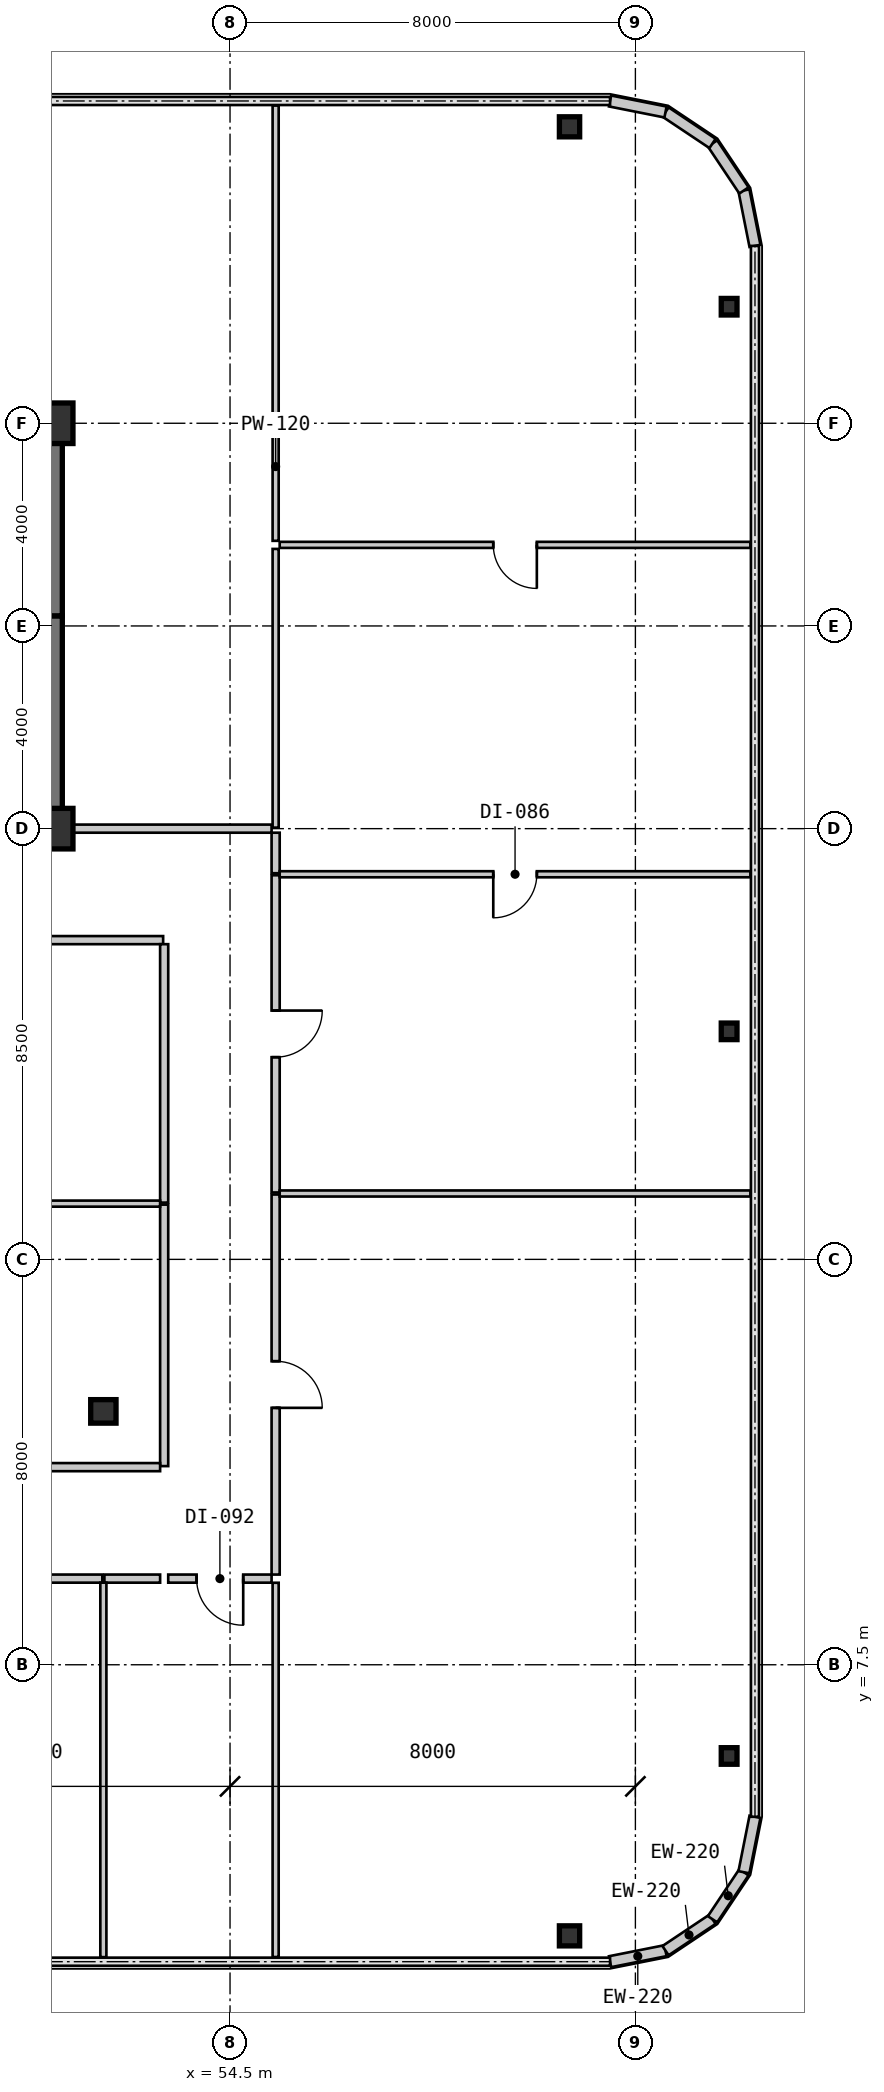
"""IFC4 building model, lengths in metres.
Left out: names, types, materials, properties, quantities, classifications, styles, units other than length and angle.
Written with IfcOpenShell. Run it as: python <this file> out.ifc"""

import sys

from ifc_helpers import new_model, si_unit, direction, frame, frame_2d, origin, origin_2d, place, context, subcontext, project, spatial, rectangle, i_section, extrude, source, transform, mapped, element, fill, save


model = new_model("IFC4")
c1 = context("Model", 3, precision=1e-05, world=origin(), true_north=direction((0.0, 1.0)))
c2 = subcontext(c1, "Body", "Model", "MODEL_VIEW")
j1 = project(units=[si_unit("LENGTHUNIT", "METRE"), si_unit("PLANEANGLEUNIT", "RADIAN")], contexts=[c1])
p1 = place(None, origin())
s1 = spatial("IfcSite", under=j1, at=p1, CompositionType="ELEMENT")
p2 = place(p1, origin())
s2 = spatial("IfcBuilding", under=s1, at=p2, CompositionType="ELEMENT")
p3 = place(p2, frame((0.0, 0.0, 45.15)))
s3 = spatial("IfcBuildingStorey", under=s2, at=p3, CompositionType="ELEMENT", Elevation=45.15)
m1 = source(origin(), c2, "Body", "SweptSolid", [
    extrude(rectangle(XDim=0.8, YDim=0.8, at=origin_2d()), origin(), (0.0, 0.0, 1.0), 3.15),
])
for number, where, z_axis, x_axis in (
    (1, (51.0, 24.0, 0.0), (0.0, 0.0, 1.0), (1.0, 0.0, 0.0)),
    (2, (51.0, 32.0, 0.0), (0.0, 0.0, 1.0), (1.0, 0.0, 0.0)),
):
    element("IfcColumn", number, at=place(p3, frame(where, z_axis=z_axis, x_axis=x_axis)), inside=s3, PredefinedType="COLUMN", context=c2, shape_type="MappedRepresentation", body=[
        mapped(m1, transform((0.0, 0.0, 0.0), scale=1.0)),
    ])
m2 = source(origin(), c2, "Body", "SweptSolid", [
    extrude(i_section(OverallWidth=0.5, OverallDepth=0.464, WebThickness=0.022, FlangeThickness=0.034, at=origin_2d()), origin(), (0.0, 0.0, 1.0), 3.15),
])
p4 = place(p3, frame((52.0, 12.5, 0.0), z_axis=(0.0, 0.0, 1.0), x_axis=(1.0, 0.0, 0.0)))
e3 = element("IfcColumn", 3, at=p4, inside=s3, PredefinedType="COLUMN", context=c2, shape_type="MappedRepresentation", body=[
    mapped(m2, transform((0.0, 0.0, 0.0), scale=1.0)),
])
m3 = source(origin(), c2, "Body", "SweptSolid", [
    extrude(i_section(OverallWidth=0.4, OverallDepth=0.396, WebThickness=0.022, FlangeThickness=0.034, at=origin_2d()), origin(), (0.0, 0.0, 1.0), 3.15),
])
for number, where, z_axis, x_axis in (
    (4, (61.2, 2.15, 0.0), (0.0, 0.0, 1.0), (1.0, 0.0, 0.0)),
    (5, (61.2, 37.85, 0.0), (0.0, 0.0, 1.0), (1.0, 0.0, 0.0)),
):
    element("IfcColumn", number, at=place(p3, frame(where, z_axis=z_axis, x_axis=x_axis)), inside=s3, PredefinedType="COLUMN", context=c2, shape_type="MappedRepresentation", body=[
        mapped(m3, transform((0.0, 0.0, 0.0), scale=1.0)),
    ])
m4 = source(origin(), c2, "Body", "SweptSolid", [
    extrude(i_section(OverallWidth=0.311, OverallDepth=0.327, WebThickness=0.016, FlangeThickness=0.025, at=origin_2d()), origin(), (0.0, 0.0, 1.0), 3.15),
])
for number, where, z_axis, x_axis in (
    (6, (64.35, 5.7, 0.0), (0.0, 0.0, 1.0), (1.0, 0.0, 0.0)),
    (7, (64.35, 20.0, 0.0), (0.0, 0.0, 1.0), (1.0, 0.0, 0.0)),
    (8, (64.35, 34.3, 0.0), (0.0, 0.0, 1.0), (1.0, 0.0, 0.0)),
):
    element("IfcColumn", number, at=place(p3, frame(where, z_axis=z_axis, x_axis=x_axis)), inside=s3, PredefinedType="COLUMN", context=c2, shape_type="MappedRepresentation", body=[
        mapped(m4, transform((0.0, 0.0, 0.0), scale=1.0)),
    ])
m5 = source(origin(), c2, "Body", "SweptSolid", [
    extrude(rectangle(XDim=1.116, YDim=0.22, at=frame_2d((0.558, 0.0))), origin(), (0.0, 0.0, 1.0), 2.93),
])
for number, where, z_axis, x_axis in (
    (9, (62.0, 1.64, 0.0), (0.0, 0.0, 1.0), (0.981, 0.195, 0.0)),
    (10, (63.094, 1.858, 0.0), (0.0, 0.0, 1.0), (0.831, 0.556, 0.0)),
    (11, (64.022, 2.478, 0.0), (0.0, 0.0, 1.0), (0.556, 0.831, 0.0)),
    (12, (64.642, 3.406, 0.0), (0.0, 0.0, 1.0), (0.195, 0.981, 0.0)),
    (13, (64.86, 35.5, 0.0), (0.0, 0.0, 1.0), (-0.195, 0.981, 0.0)),
    (14, (64.642, 36.594, 0.0), (0.0, 0.0, 1.0), (-0.556, 0.831, 0.0)),
    (15, (64.022, 37.522, 0.0), (0.0, 0.0, 1.0), (-0.831, 0.556, 0.0)),
    (16, (63.094, 38.142, 0.0), (0.0, 0.0, 1.0), (-0.981, 0.195, 0.0)),
):
    element("IfcWall", number, at=place(p3, frame(where, z_axis=z_axis, x_axis=x_axis)), inside=s3, PredefinedType="SOLIDWALL", context=c2, shape_type="MappedRepresentation", body=[
        mapped(m5, transform((0.0, 0.0, 0.0), scale=1.0)),
    ])
m6 = source(origin(), c2, "Body", "SweptSolid", [
    extrude(rectangle(XDim=11.99, YDim=0.38, at=frame_2d((5.995, 0.0))), origin(), (0.0, 0.0, 1.0), 2.93),
])
p5 = place(p3, frame((39.2, 32.0, 0.0), z_axis=(0.0, 0.0, 1.0), x_axis=(1.0, 0.0, 0.0)))
e17 = element("IfcWall", 17, at=p5, inside=s3, PredefinedType="SHEAR", context=c2, shape_type="MappedRepresentation", body=[
    mapped(m6, transform((0.0, 0.0, 0.0), scale=1.0)),
])
m7 = source(origin(), c2, "Body", "SweptSolid", [
    extrude(rectangle(XDim=4.01, YDim=0.38, at=frame_2d((2.005, 0.0))), origin(), (0.0, 0.0, 1.0), 2.93),
])
p6 = place(p3, frame((51.0, 24.19, 0.0), z_axis=(0.0, 0.0, 1.0), x_axis=(0.0, 1.0, 0.0)))
e18 = element("IfcWall", 18, at=p6, inside=s3, PredefinedType="SHEAR", context=c2, shape_type="MappedRepresentation", body=[
    mapped(m7, transform((0.0, 0.0, 0.0), scale=1.0)),
])
m8 = source(origin(), c2, "Body", "SweptSolid", [
    extrude(rectangle(XDim=3.61, YDim=0.38, at=frame_2d((1.805, 0.0))), origin(), (0.0, 0.0, 1.0), 2.93),
])
p7 = place(p3, frame((51.0, 28.2, 0.0), z_axis=(0.0, 0.0, 1.0), x_axis=(0.0, 1.0, 0.0)))
e19 = element("IfcWall", 19, at=p7, inside=s3, PredefinedType="SHEAR", context=c2, shape_type="MappedRepresentation", body=[
    mapped(m8, transform((0.0, 0.0, 0.0), scale=1.0)),
])
m9 = source(origin(), c2, "Body", "SweptSolid", [
    extrude(rectangle(XDim=4.98, YDim=0.38, at=frame_2d((2.49, 0.0))), origin(), (0.0, 0.0, 1.0), 2.93),
])
p8 = place(p3, frame((46.21, 24.0, 0.0), z_axis=(0.0, 0.0, 1.0), x_axis=(1.0, 0.0, 0.0)))
e20 = element("IfcWall", 20, at=p8, inside=s3, PredefinedType="SHEAR", context=c2, shape_type="MappedRepresentation", body=[
    mapped(m9, transform((0.0, 0.0, 0.0), scale=1.0)),
])
m10 = source(origin(), c2, "Body", "SweptSolid", [
    extrude(rectangle(XDim=5.16, YDim=0.16, at=frame_2d((2.58, 0.0))), origin(), (0.0, 0.0, 1.0), 2.93),
])
p9 = place(p3, frame((53.2, 11.42, 0.0), z_axis=(0.0, 0.0, 1.0), x_axis=(0.0, 1.0, 0.0)))
e21 = element("IfcWall", 21, at=p9, inside=s3, PredefinedType="PARTITIONING", context=c2, shape_type="MappedRepresentation", body=[
    mapped(m10, transform((0.0, 0.0, 0.0), scale=1.0)),
])
m11 = source(origin(), c2, "Body", "SweptSolid", [
    extrude(rectangle(XDim=12.159, YDim=0.16, at=frame_2d((6.08, 0.0))), origin(), (0.0, 0.0, 1.0), 2.93),
])
p10 = place(p3, frame((53.18, 21.8, 0.0), z_axis=(0.0, 0.0, 1.0), x_axis=(-1.0, 0.0, 0.0)))
e22 = element("IfcWall", 22, at=p10, inside=s3, PredefinedType="PARTITIONING", context=c2, shape_type="MappedRepresentation", body=[
    mapped(m11, transform((0.0, 0.0, 0.0), scale=1.0)),
])
m12 = source(origin(), c2, "Body", "SweptSolid", [
    extrude(rectangle(XDim=1.05, YDim=2.1, at=frame_2d((0.525, 1.05))), frame((0.0, 0.09, 0.0), z_axis=(0.0, -1.0, 0.0), x_axis=(1.0, 0.0, 0.0)), (0.0, 0.0, 1.0), 0.18),
])
p11 = place(p10, frame((5.555, 0.0, 0.0)))
e23 = element("IfcOpeningElement", 23, at=p11, cuts=e22, PredefinedType="OPENING", context=c2, shape_type="MappedRepresentation", body=[
    mapped(m12, transform((0.0, 0.0, 0.0), scale=1.0)),
])
m13 = source(origin(), c2, "Body", "SweptSolid", [
    extrude(rectangle(XDim=5.1, YDim=0.16, at=frame_2d((2.55, 0.0))), origin(), (0.0, 0.0, 1.0), 2.93),
])
p12 = place(p3, frame((53.2, 16.62, 0.0), z_axis=(0.0, 0.0, 1.0), x_axis=(0.0, 1.0, 0.0)))
e24 = element("IfcWall", 24, at=p12, inside=s3, PredefinedType="PARTITIONING", context=c2, shape_type="MappedRepresentation", body=[
    mapped(m13, transform((0.0, 0.0, 0.0), scale=1.0)),
])
m14 = source(origin(), c2, "Body", "SweptSolid", [
    extrude(rectangle(XDim=2.04, YDim=0.16, at=frame_2d((1.02, 0.0))), origin(), (0.0, 0.0, 1.0), 2.93),
])
p13 = place(p3, frame((55.32, 9.2, 0.0), z_axis=(0.0, 0.0, 1.0), x_axis=(-1.0, 0.0, 0.0)))
e25 = element("IfcWall", 25, at=p13, inside=s3, PredefinedType="PARTITIONING", context=c2, shape_type="MappedRepresentation", body=[
    mapped(m14, transform((0.0, 0.0, 0.0), scale=1.0)),
])
m15 = source(origin(), c2, "Body", "SweptSolid", [
    extrude(rectangle(XDim=0.92, YDim=2.1, at=frame_2d((0.46, 1.05))), frame((0.0, 0.09, 0.0), z_axis=(0.0, -1.0, 0.0), x_axis=(1.0, 0.0, 0.0)), (0.0, 0.0, 1.0), 0.18),
])
p14 = place(p13, frame((0.56, 0.0, 0.0)))
e26 = element("IfcOpeningElement", 26, at=p14, cuts=e25, PredefinedType="OPENING", context=c2, shape_type="MappedRepresentation", body=[
    mapped(m15, transform((0.0, 0.0, 0.0), scale=1.0)),
])
m16 = source(origin(), c2, "Body", "SweptSolid", [
    extrude(rectangle(XDim=7.5, YDim=0.16, at=frame_2d((3.75, 0.0))), origin(), (0.0, 0.0, 1.0), 2.93),
])
p15 = place(p3, frame((55.4, 16.78, 0.0), z_axis=(0.0, 0.0, 1.0), x_axis=(0.0, -1.0, 0.0)))
e27 = element("IfcWall", 27, at=p15, inside=s3, PredefinedType="PARTITIONING", context=c2, shape_type="MappedRepresentation", body=[
    mapped(m16, transform((0.0, 0.0, 0.0), scale=1.0)),
])
p16 = place(p15, frame((3.29, 0.0, 0.0)))
e28 = element("IfcOpeningElement", 28, at=p16, cuts=e27, PredefinedType="OPENING", context=c2, shape_type="MappedRepresentation", body=[
    mapped(m15, transform((0.0, 0.0, 0.0), scale=1.0)),
])
m17 = source(origin(), c2, "Body", "SweptSolid", [
    extrude(rectangle(XDim=6.26, YDim=0.16, at=frame_2d((3.13, 0.0))), origin(), (0.0, 0.0, 1.0), 2.93),
])
p17 = place(p3, frame((55.4, 23.08, 0.0), z_axis=(0.0, 0.0, 1.0), x_axis=(0.0, -1.0, 0.0)))
e29 = element("IfcWall", 29, at=p17, inside=s3, PredefinedType="PARTITIONING", context=c2, shape_type="MappedRepresentation", body=[
    mapped(m17, transform((0.0, 0.0, 0.0), scale=1.0)),
])
p18 = place(p17, frame((2.67, 0.0, 0.0)))
e30 = element("IfcOpeningElement", 30, at=p18, cuts=e29, PredefinedType="OPENING", context=c2, shape_type="MappedRepresentation", body=[
    mapped(m15, transform((0.0, 0.0, 0.0), scale=1.0)),
])
m18 = source(origin(), c2, "Body", "SweptSolid", [
    extrude(rectangle(XDim=0.8, YDim=0.16, at=frame_2d((0.4, 0.0))), origin(), (0.0, 0.0, 1.0), 2.93),
])
p19 = place(p3, frame((55.4, 23.92, 0.0), z_axis=(0.0, 0.0, 1.0), x_axis=(0.0, -1.0, 0.0)))
e31 = element("IfcWall", 31, at=p19, inside=s3, PredefinedType="PARTITIONING", context=c2, shape_type="MappedRepresentation", body=[
    mapped(m18, transform((0.0, 0.0, 0.0), scale=1.0)),
])
m19 = source(origin(), c2, "Body", "SweptSolid", [
    extrude(rectangle(XDim=4.13, YDim=0.16, at=frame_2d((2.065, 0.0))), origin(), (0.0, 0.0, 1.0), 2.93),
])
p20 = place(p3, frame((51.19, 24.0, 0.0), z_axis=(0.0, 0.0, 1.0), x_axis=(1.0, 0.0, 0.0)))
e32 = element("IfcWall", 32, at=p20, inside=s3, PredefinedType="PARTITIONING", context=c2, shape_type="MappedRepresentation", body=[
    mapped(m19, transform((0.0, 0.0, 0.0), scale=1.0)),
])
m20 = source(origin(), c2, "Body", "SweptSolid", [
    extrude(rectangle(XDim=12.1, YDim=0.16, at=frame_2d((6.05, 0.0))), origin(), (0.0, 0.0, 1.0), 2.93),
])
p21 = place(p3, frame((41.02, 11.4, 0.0), z_axis=(0.0, 0.0, 1.0), x_axis=(1.0, 0.0, 0.0)))
e33 = element("IfcWall", 33, at=p21, inside=s3, PredefinedType="PARTITIONING", context=c2, shape_type="MappedRepresentation", body=[
    mapped(m20, transform((0.0, 0.0, 0.0), scale=1.0)),
])
p22 = place(p21, frame((5.525, 0.0, 0.0)))
e34 = element("IfcOpeningElement", 34, at=p22, cuts=e33, PredefinedType="OPENING", context=c2, shape_type="MappedRepresentation", body=[
    mapped(m12, transform((0.0, 0.0, 0.0), scale=1.0)),
])
m21 = source(origin(), c2, "Body", "SweptSolid", [
    extrude(rectangle(XDim=9.959, YDim=0.16, at=frame_2d((4.98, 0.0))), origin(), (0.0, 0.0, 1.0), 2.93),
])
p23 = place(p3, frame((51.98, 9.2, 0.0), z_axis=(0.0, 0.0, 1.0), x_axis=(-1.0, 0.0, 0.0)))
e35 = element("IfcWall", 35, at=p23, inside=s3, PredefinedType="PARTITIONING", context=c2, shape_type="MappedRepresentation", body=[
    mapped(m21, transform((0.0, 0.0, 0.0), scale=1.0)),
])
p24 = place(p23, frame((4.52, 0.0, 0.0)))
e36 = element("IfcOpeningElement", 36, at=p24, cuts=e35, PredefinedType="OPENING", context=c2, shape_type="MappedRepresentation", body=[
    mapped(m15, transform((0.0, 0.0, 0.0), scale=1.0)),
])
m22 = source(origin(), c2, "Body", "SweptSolid", [
    extrude(rectangle(XDim=1.1, YDim=0.16, at=frame_2d((0.55, 0.0))), origin(), (0.0, 0.0, 1.0), 2.93),
])
p25 = place(p3, frame((53.12, 9.2, 0.0), z_axis=(0.0, 0.0, 1.0), x_axis=(-1.0, 0.0, 0.0)))
e37 = element("IfcWall", 37, at=p25, inside=s3, PredefinedType="PARTITIONING", context=c2, shape_type="MappedRepresentation", body=[
    mapped(m22, transform((0.0, 0.0, 0.0), scale=1.0)),
])
m23 = source(origin(), c2, "Body", "SweptSolid", [
    extrude(rectangle(XDim=12.04, YDim=0.12, at=frame_2d((6.02, 0.0))), origin(), (0.0, 0.0, 1.0), 2.93),
])
p26 = place(p3, frame((41.08, 16.6, 0.0), z_axis=(0.0, 0.0, 1.0), x_axis=(1.0, 0.0, 0.0)))
e38 = element("IfcWall", 38, at=p26, inside=s3, PredefinedType="PARTITIONING", context=c2, shape_type="MappedRepresentation", body=[
    mapped(m23, transform((0.0, 0.0, 0.0), scale=1.0)),
])
m24 = source(origin(), c2, "Body", "SweptSolid", [
    extrude(rectangle(XDim=7.39, YDim=0.12, at=frame_2d((3.695, 0.0))), origin(), (0.0, 0.0, 1.0), 2.93),
])
p27 = place(p3, frame((52.0, 9.12, 0.0), z_axis=(0.0, 0.0, 1.0), x_axis=(0.0, -1.0, 0.0)))
e39 = element("IfcWall", 39, at=p27, inside=s3, PredefinedType="PARTITIONING", context=c2, shape_type="MappedRepresentation", body=[
    mapped(m24, transform((0.0, 0.0, 0.0), scale=1.0)),
])
m25 = source(origin(), c2, "Body", "SweptSolid", [
    extrude(rectangle(XDim=7.386, YDim=0.12, at=frame_2d((3.693, 0.0))), origin(), (0.0, 0.0, 1.0), 2.93),
])
p28 = place(p3, frame((55.4, 9.118, 0.0), z_axis=(0.0, 0.0, 1.0), x_axis=(0.0, -1.0, 0.0)))
e40 = element("IfcWall", 40, at=p28, inside=s3, PredefinedType="PARTITIONING", context=c2, shape_type="MappedRepresentation", body=[
    mapped(m25, transform((0.0, 0.0, 0.0), scale=1.0)),
])
m26 = source(origin(), c2, "Body", "SweptSolid", [
    extrude(rectangle(XDim=9.29, YDim=0.12, at=frame_2d((4.645, 0.0))), origin(), (0.0, 0.0, 1.0), 2.93),
])
p29 = place(p3, frame((55.48, 16.8, 0.0), z_axis=(0.0, 0.0, 1.0), x_axis=(1.0, 0.0, 0.0)))
e41 = element("IfcWall", 41, at=p29, inside=s3, PredefinedType="PARTITIONING", context=c2, shape_type="MappedRepresentation", body=[
    mapped(m26, transform((0.0, 0.0, 0.0), scale=1.0)),
])
p30 = place(p3, frame((55.48, 23.1, 0.0), z_axis=(0.0, 0.0, 1.0), x_axis=(1.0, 0.0, 0.0)))
e42 = element("IfcWall", 42, at=p30, inside=s3, PredefinedType="PARTITIONING", context=c2, shape_type="MappedRepresentation", body=[
    mapped(m26, transform((0.0, 0.0, 0.0), scale=1.0)),
])
m27 = source(origin(), c2, "Body", "SweptSolid", [
    extrude(rectangle(XDim=0.86, YDim=2.1, at=frame_2d((0.43, 1.05))), frame((0.0, 0.07, 0.0), z_axis=(0.0, -1.0, 0.0), x_axis=(1.0, 0.0, 0.0)), (0.0, 0.0, 1.0), 0.14),
])
p31 = place(p30, frame((4.215, 0.0, 0.0)))
e43 = element("IfcOpeningElement", 43, at=p31, cuts=e42, PredefinedType="OPENING", context=c2, shape_type="MappedRepresentation", body=[
    mapped(m27, transform((0.0, 0.0, 0.0), scale=1.0)),
])
p32 = place(p3, frame((55.48, 29.6, 0.0), z_axis=(0.0, 0.0, 1.0), x_axis=(1.0, 0.0, 0.0)))
e44 = element("IfcWall", 44, at=p32, inside=s3, PredefinedType="PARTITIONING", context=c2, shape_type="MappedRepresentation", body=[
    mapped(m26, transform((0.0, 0.0, 0.0), scale=1.0)),
])
p33 = place(p32, frame((4.215, 0.0, 0.0)))
e45 = element("IfcOpeningElement", 45, at=p33, cuts=e44, PredefinedType="OPENING", context=c2, shape_type="MappedRepresentation", body=[
    mapped(m27, transform((0.0, 0.0, 0.0), scale=1.0)),
])
m28 = source(origin(), c2, "Body", "SweptSolid", [
    extrude(rectangle(XDim=5.5, YDim=0.12, at=frame_2d((2.75, 0.0))), origin(), (0.0, 0.0, 1.0), 2.93),
])
p34 = place(p3, frame((55.4, 24.02, 0.0), z_axis=(0.0, 0.0, 1.0), x_axis=(0.0, 1.0, 0.0)))
e46 = element("IfcWall", 46, at=p34, inside=s3, PredefinedType="PARTITIONING", context=c2, shape_type="MappedRepresentation", body=[
    mapped(m28, transform((0.0, 0.0, 0.0), scale=1.0)),
])
m29 = source(origin(), c2, "Body", "SweptSolid", [
    extrude(rectangle(XDim=8.59, YDim=0.12, at=frame_2d((4.295, 0.0))), origin(), (0.0, 0.0, 1.0), 2.93),
])
p35 = place(p3, frame((55.4, 29.68, 0.0), z_axis=(0.0, 0.0, 1.0), x_axis=(0.0, 1.0, 0.0)))
e47 = element("IfcWall", 47, at=p35, inside=s3, PredefinedType="PARTITIONING", context=c2, shape_type="MappedRepresentation", body=[
    mapped(m29, transform((0.0, 0.0, 0.0), scale=1.0)),
])
m30 = source(origin(), c2, "Body", "SweptSolid", [
    extrude(rectangle(XDim=0.92, YDim=2.1, at=frame_2d((0.46, 1.05))), frame((0.0, 0.025, 0.0), z_axis=(0.0, -1.0, 0.0), x_axis=(1.0, 0.0, 0.0)), (0.0, 0.0, 1.0), 0.05),
])
p36 = place(p14, origin())
e48 = element("IfcDoor", 48, at=p36, inside=s3, OperationType="SINGLE_SWING_LEFT", PredefinedType="DOOR", context=c2, shape_type="MappedRepresentation", body=[
    mapped(m30, transform((0.0, 0.0, 0.0), scale=1.0)),
])
fill(e26, e48)
p37 = place(p16, origin())
e49 = element("IfcDoor", 49, at=p37, inside=s3, OperationType="SINGLE_SWING_RIGHT", PredefinedType="DOOR", context=c2, shape_type="MappedRepresentation", body=[
    mapped(m30, transform((0.0, 0.0, 0.0), scale=1.0)),
])
fill(e28, e49)
p38 = place(p18, origin())
e50 = element("IfcDoor", 50, at=p38, inside=s3, OperationType="SINGLE_SWING_LEFT", PredefinedType="DOOR", context=c2, shape_type="MappedRepresentation", body=[
    mapped(m30, transform((0.0, 0.0, 0.0), scale=1.0)),
])
fill(e30, e50)
m31 = source(origin(), c2, "Body", "SweptSolid", [
    extrude(rectangle(XDim=0.86, YDim=2.1, at=frame_2d((0.43, 1.05))), frame((0.0, 0.025, 0.0), z_axis=(0.0, -1.0, 0.0), x_axis=(1.0, 0.0, 0.0)), (0.0, 0.0, 1.0), 0.05),
])
p39 = place(p31, frame((0.86, 0.0, 0.0), z_axis=(0.0, 0.0, 1.0), x_axis=(-1.0, 0.0, 0.0)))
e51 = element("IfcDoor", 51, at=p39, inside=s3, OperationType="SINGLE_SWING_RIGHT", PredefinedType="DOOR", context=c2, shape_type="MappedRepresentation", body=[
    mapped(m31, transform((0.0, 0.0, 0.0), scale=1.0)),
])
fill(e43, e51)
p40 = place(p33, frame((0.86, 0.0, 0.0), z_axis=(0.0, 0.0, 1.0), x_axis=(-1.0, 0.0, 0.0)))
e52 = element("IfcDoor", 52, at=p40, inside=s3, OperationType="SINGLE_SWING_LEFT", PredefinedType="DOOR", context=c2, shape_type="MappedRepresentation", body=[
    mapped(m31, transform((0.0, 0.0, 0.0), scale=1.0)),
])
fill(e45, e52)
save(model, sys.argv[1])
